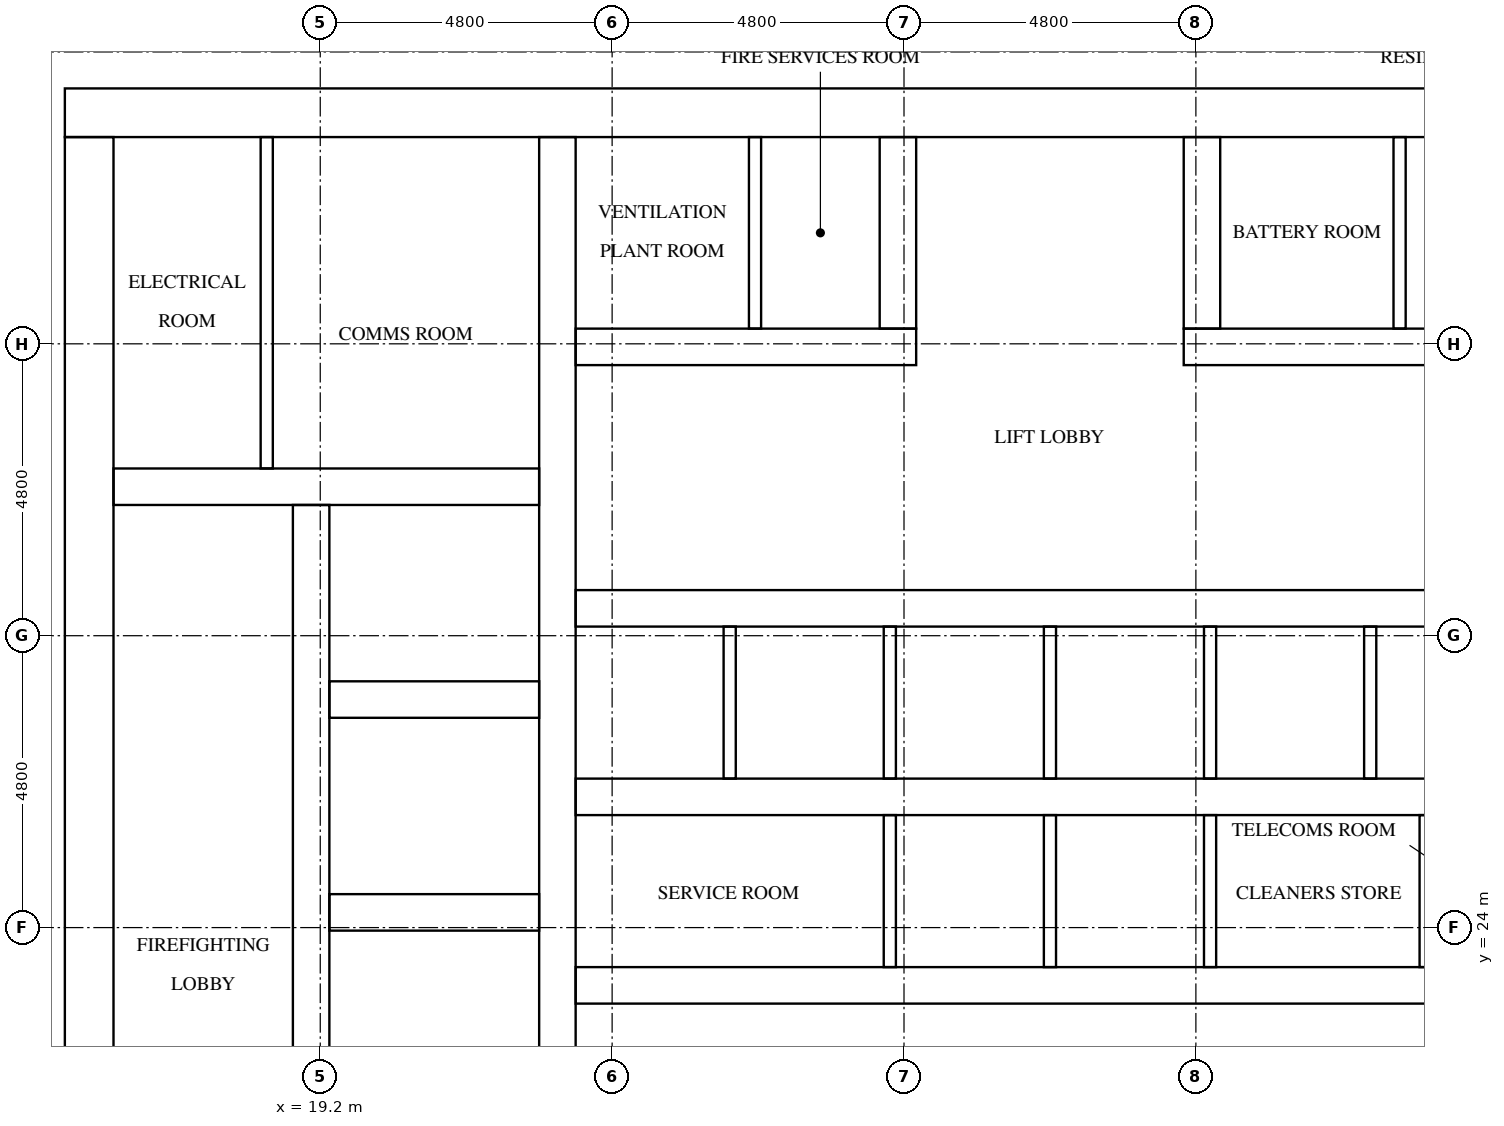
"""IFC4 building model, lengths in metres.
Left out: names, types, materials, properties, quantities, classifications, styles, units other than length and angle.
Written with IfcOpenShell. Run it as: python <this file> out.ifc"""

import sys

from ifc_helpers import new_model, si_unit, direction, frame, frame_2d, origin, place, context, subcontext, project, spatial, rectangle, extrude, element, fill, save


model = new_model("IFC4")
c1 = context("Model", 3, precision=1e-05, world=origin(), true_north=direction((0.0, 1.0)))
c2 = subcontext(c1, "Body", "Model", "MODEL_VIEW")
j1 = project(units=[si_unit("LENGTHUNIT", "METRE"), si_unit("PLANEANGLEUNIT", "RADIAN")], contexts=[c1])
p1 = place(None, origin())
s1 = spatial("IfcSite", under=j1, at=p1, CompositionType="ELEMENT")
p2 = place(p1, origin())
s2 = spatial("IfcBuilding", under=s1, at=p2, CompositionType="ELEMENT")
p3 = place(p2, frame((0.0, 0.0, 159.5)))
s3 = spatial("IfcBuildingStorey", under=s2, at=p3, CompositionType="ELEMENT", Elevation=159.5)
p4 = place(p3, frame((15.0, 37.4, 0.0), z_axis=(0.0, 0.0, 1.0), x_axis=(1.0, 0.0, 0.0)))
e1 = element("IfcWall", 1, at=p4, inside=s3, PredefinedType="SHEAR", context=c2, shape_type="SweptSolid", body=[
    extrude(rectangle(XDim=32.4, YDim=0.8, at=frame_2d((16.2, 0.0))), origin(), (0.0, 0.0, 1.0), 3.2),
])
p5 = place(p4, frame((15.3, 0.0, 0.0)))
e2 = element("IfcOpeningElement", 2, at=p5, cuts=e1, PredefinedType="OPENING", context=c2, shape_type="SweptSolid", body=[
    extrude(rectangle(XDim=1.8, YDim=2.1, at=frame_2d((0.9, 1.05))), frame((0.0, 0.41, 0.0), z_axis=(0.0, -1.0, 0.0), x_axis=(1.0, 0.0, 0.0)), (0.0, 0.0, 1.0), 0.82),
])
p6 = place(p4, frame((1.51, 0.0, 0.0)))
e3 = element("IfcOpeningElement", 3, at=p6, cuts=e1, PredefinedType="OPENING", context=c2, shape_type="SweptSolid", body=[
    extrude(rectangle(XDim=1.0, YDim=2.1, at=frame_2d((0.5, 1.05))), frame((0.0, 0.41, 0.0), z_axis=(0.0, -1.0, 0.0), x_axis=(1.0, 0.0, 0.0)), (0.0, 0.0, 1.0), 0.82),
])
p7 = place(p4, frame((5.11, 0.0, 0.0)))
e4 = element("IfcOpeningElement", 4, at=p7, cuts=e1, PredefinedType="OPENING", context=c2, shape_type="SweptSolid", body=[
    extrude(rectangle(XDim=1.0, YDim=2.1, at=frame_2d((0.5, 1.05))), frame((0.0, 0.41, 0.0), z_axis=(0.0, -1.0, 0.0), x_axis=(1.0, 0.0, 0.0)), (0.0, 0.0, 1.0), 0.82),
])
p8 = place(p3, frame((15.4, 15.8, 0.0), z_axis=(0.0, 0.0, 1.0), x_axis=(0.0, 1.0, 0.0)))
e5 = element("IfcWall", 5, at=p8, inside=s3, PredefinedType="SHEAR", context=c2, shape_type="SweptSolid", body=[
    extrude(rectangle(XDim=21.2, YDim=0.8, at=frame_2d((10.6, 0.0))), origin(), (0.0, 0.0, 1.0), 3.2),
])
p9 = place(p8, frame((4.96, 0.0, 0.0)))
e6 = element("IfcOpeningElement", 6, at=p9, cuts=e5, PredefinedType="OPENING", context=c2, shape_type="SweptSolid", body=[
    extrude(rectangle(XDim=1.2, YDim=2.1, at=frame_2d((0.6, 1.05))), frame((0.0, 0.41, 0.0), z_axis=(0.0, -1.0, 0.0), x_axis=(1.0, 0.0, 0.0)), (0.0, 0.0, 1.0), 0.82),
])
p10 = place(p3, frame((19.05, 15.8, 0.0), z_axis=(0.0, 0.0, 1.0), x_axis=(0.0, 1.0, 0.0)))
e7 = element("IfcWall", 7, at=p10, inside=s3, PredefinedType="SHEAR", context=c2, shape_type="SweptSolid", body=[
    extrude(rectangle(XDim=15.15, YDim=0.6, at=frame_2d((7.575, 0.0))), origin(), (0.0, 0.0, 1.0), 3.2),
])
p11 = place(p10, frame((9.65, 0.0, 0.0)))
e8 = element("IfcOpeningElement", 8, at=p11, cuts=e7, PredefinedType="OPENING", context=c2, shape_type="SweptSolid", body=[
    extrude(rectangle(XDim=1.1, YDim=2.1, at=frame_2d((0.55, 1.05))), frame((0.0, 0.31, 0.0), z_axis=(0.0, -1.0, 0.0), x_axis=(1.0, 0.0, 0.0)), (0.0, 0.0, 1.0), 0.62),
])
p12 = place(p10, frame((13.15, 0.0, 0.0)))
e9 = element("IfcOpeningElement", 9, at=p12, cuts=e7, PredefinedType="OPENING", context=c2, shape_type="SweptSolid", body=[
    extrude(rectangle(XDim=1.1, YDim=2.1, at=frame_2d((0.55, 1.05))), frame((0.0, 0.31, 0.0), z_axis=(0.0, -1.0, 0.0), x_axis=(1.0, 0.0, 0.0)), (0.0, 0.0, 1.0), 0.62),
])
p13 = place(p10, frame((0.4, 0.0, 0.0)))
e10 = element("IfcOpeningElement", 10, at=p13, cuts=e7, PredefinedType="OPENING", context=c2, shape_type="SweptSolid", body=[
    extrude(rectangle(XDim=1.2, YDim=2.1, at=frame_2d((0.6, 1.05))), frame((0.0, 0.31, 0.0), z_axis=(0.0, -1.0, 0.0), x_axis=(1.0, 0.0, 0.0)), (0.0, 0.0, 1.0), 0.62),
])
p14 = place(p3, frame((23.1, 15.8, 0.0), z_axis=(0.0, 0.0, 1.0), x_axis=(0.0, 1.0, 0.0)))
e11 = element("IfcWall", 11, at=p14, inside=s3, PredefinedType="SHEAR", context=c2, shape_type="SweptSolid", body=[
    extrude(rectangle(XDim=21.2, YDim=0.6, at=frame_2d((10.6, 0.0))), origin(), (0.0, 0.0, 1.0), 3.2),
])
for number, where, z_axis, x_axis in (
    (12, (19.35, 24.25, 0.0), (0.0, 0.0, 1.0), (1.0, 0.0, 0.0)),
    (13, (19.35, 27.75, 0.0), (0.0, 0.0, 1.0), (1.0, 0.0, 0.0)),
):
    element("IfcWall", number, at=place(p3, frame(where, z_axis=z_axis, x_axis=x_axis)), inside=s3, PredefinedType="SHEAR", context=c2, shape_type="SweptSolid", body=[
        extrude(rectangle(XDim=3.45, YDim=0.6, at=frame_2d((1.725, 0.0))), origin(), (0.0, 0.0, 1.0), 3.2),
    ])
p15 = place(p3, frame((15.8, 31.25, 0.0), z_axis=(0.0, 0.0, 1.0), x_axis=(1.0, 0.0, 0.0)))
e14 = element("IfcWall", 14, at=p15, inside=s3, PredefinedType="SHEAR", context=c2, shape_type="SweptSolid", body=[
    extrude(rectangle(XDim=7.0, YDim=0.6, at=frame_2d((3.5, 0.0))), origin(), (0.0, 0.0, 1.0), 3.2),
])
p16 = place(p3, frame((23.4, 23.05, 0.0), z_axis=(0.0, 0.0, 1.0), x_axis=(1.0, 0.0, 0.0)))
e15 = element("IfcWall", 15, at=p16, inside=s3, PredefinedType="SHEAR", context=c2, shape_type="SweptSolid", body=[
    extrude(rectangle(XDim=15.6, YDim=0.6, at=frame_2d((7.8, 0.0))), origin(), (0.0, 0.0, 1.0), 3.2),
])
p17 = place(p16, frame((2.033, 0.0, 0.0)))
e16 = element("IfcOpeningElement", 16, at=p17, cuts=e15, PredefinedType="OPENING", context=c2, shape_type="SweptSolid", body=[
    extrude(rectangle(XDim=1.0, YDim=2.1, at=frame_2d((0.5, 1.05))), frame((0.0, 0.31, 0.0), z_axis=(0.0, -1.0, 0.0), x_axis=(1.0, 0.0, 0.0)), (0.0, 0.0, 1.0), 0.62),
])
p18 = place(p16, frame((11.706, 0.0, 0.0)))
e17 = element("IfcOpeningElement", 17, at=p18, cuts=e15, PredefinedType="OPENING", context=c2, shape_type="SweptSolid", body=[
    extrude(rectangle(XDim=1.0, YDim=2.1, at=frame_2d((0.5, 1.05))), frame((0.0, 0.31, 0.0), z_axis=(0.0, -1.0, 0.0), x_axis=(1.0, 0.0, 0.0)), (0.0, 0.0, 1.0), 0.62),
])
p19 = place(p16, frame((14.339, 0.0, 0.0)))
e18 = element("IfcOpeningElement", 18, at=p19, cuts=e15, PredefinedType="OPENING", context=c2, shape_type="SweptSolid", body=[
    extrude(rectangle(XDim=1.0, YDim=2.1, at=frame_2d((0.5, 1.05))), frame((0.0, 0.31, 0.0), z_axis=(0.0, -1.0, 0.0), x_axis=(1.0, 0.0, 0.0)), (0.0, 0.0, 1.0), 0.62),
])
p20 = place(p3, frame((23.4, 26.15, 0.0), z_axis=(0.0, 0.0, 1.0), x_axis=(1.0, 0.0, 0.0)))
e19 = element("IfcWall", 19, at=p20, inside=s3, PredefinedType="SHEAR", context=c2, shape_type="SweptSolid", body=[
    extrude(rectangle(XDim=15.6, YDim=0.6, at=frame_2d((7.8, 0.0))), origin(), (0.0, 0.0, 1.0), 3.2),
])
p21 = place(p3, frame((23.4, 29.25, 0.0), z_axis=(0.0, 0.0, 1.0), x_axis=(1.0, 0.0, 0.0)))
e20 = element("IfcWall", 20, at=p21, inside=s3, PredefinedType="SHEAR", context=c2, shape_type="SweptSolid", body=[
    extrude(rectangle(XDim=15.6, YDim=0.6, at=frame_2d((7.8, 0.0))), origin(), (0.0, 0.0, 1.0), 3.2),
])
p22 = place(p21, frame((0.667, 0.0, 0.0)))
e21 = element("IfcOpeningElement", 21, at=p22, cuts=e20, PredefinedType="OPENING", context=c2, shape_type="SweptSolid", body=[
    extrude(rectangle(XDim=1.1, YDim=2.1, at=frame_2d((0.55, 1.05))), frame((0.0, 0.31, 0.0), z_axis=(0.0, -1.0, 0.0), x_axis=(1.0, 0.0, 0.0)), (0.0, 0.0, 1.0), 0.62),
])
p23 = place(p21, frame((3.3, 0.0, 0.0)))
e22 = element("IfcOpeningElement", 22, at=p23, cuts=e20, PredefinedType="OPENING", context=c2, shape_type="SweptSolid", body=[
    extrude(rectangle(XDim=1.1, YDim=2.1, at=frame_2d((0.55, 1.05))), frame((0.0, 0.31, 0.0), z_axis=(0.0, -1.0, 0.0), x_axis=(1.0, 0.0, 0.0)), (0.0, 0.0, 1.0), 0.62),
])
p24 = place(p21, frame((5.933, 0.0, 0.0)))
e23 = element("IfcOpeningElement", 23, at=p24, cuts=e20, PredefinedType="OPENING", context=c2, shape_type="SweptSolid", body=[
    extrude(rectangle(XDim=1.1, YDim=2.1, at=frame_2d((0.55, 1.05))), frame((0.0, 0.31, 0.0), z_axis=(0.0, -1.0, 0.0), x_axis=(1.0, 0.0, 0.0)), (0.0, 0.0, 1.0), 0.62),
])
p25 = place(p21, frame((8.567, 0.0, 0.0)))
e24 = element("IfcOpeningElement", 24, at=p25, cuts=e20, PredefinedType="OPENING", context=c2, shape_type="SweptSolid", body=[
    extrude(rectangle(XDim=1.1, YDim=2.1, at=frame_2d((0.55, 1.05))), frame((0.0, 0.31, 0.0), z_axis=(0.0, -1.0, 0.0), x_axis=(1.0, 0.0, 0.0)), (0.0, 0.0, 1.0), 0.62),
])
p26 = place(p21, frame((11.2, 0.0, 0.0)))
e25 = element("IfcOpeningElement", 25, at=p26, cuts=e20, PredefinedType="OPENING", context=c2, shape_type="SweptSolid", body=[
    extrude(rectangle(XDim=1.1, YDim=2.1, at=frame_2d((0.55, 1.05))), frame((0.0, 0.31, 0.0), z_axis=(0.0, -1.0, 0.0), x_axis=(1.0, 0.0, 0.0)), (0.0, 0.0, 1.0), 0.62),
])
p27 = place(p21, frame((13.833, 0.0, 0.0)))
e26 = element("IfcOpeningElement", 26, at=p27, cuts=e20, PredefinedType="OPENING", context=c2, shape_type="SweptSolid", body=[
    extrude(rectangle(XDim=1.1, YDim=2.1, at=frame_2d((0.55, 1.05))), frame((0.0, 0.31, 0.0), z_axis=(0.0, -1.0, 0.0), x_axis=(1.0, 0.0, 0.0)), (0.0, 0.0, 1.0), 0.62),
])
p28 = place(p3, frame((23.4, 33.55, 0.0), z_axis=(0.0, 0.0, 1.0), x_axis=(1.0, 0.0, 0.0)))
e27 = element("IfcWall", 27, at=p28, inside=s3, PredefinedType="SHEAR", context=c2, shape_type="SweptSolid", body=[
    extrude(rectangle(XDim=5.6, YDim=0.6, at=frame_2d((2.8, 0.0))), origin(), (0.0, 0.0, 1.0), 3.2),
])
p29 = place(p28, frame((0.925, 0.0, 0.0)))
e28 = element("IfcOpeningElement", 28, at=p29, cuts=e27, PredefinedType="OPENING", context=c2, shape_type="SweptSolid", body=[
    extrude(rectangle(XDim=1.0, YDim=2.1, at=frame_2d((0.5, 1.05))), frame((0.0, 0.31, 0.0), z_axis=(0.0, -1.0, 0.0), x_axis=(1.0, 0.0, 0.0)), (0.0, 0.0, 1.0), 0.62),
])
p30 = place(p28, frame((3.525, 0.0, 0.0)))
e29 = element("IfcOpeningElement", 29, at=p30, cuts=e27, PredefinedType="OPENING", context=c2, shape_type="SweptSolid", body=[
    extrude(rectangle(XDim=1.0, YDim=2.1, at=frame_2d((0.5, 1.05))), frame((0.0, 0.31, 0.0), z_axis=(0.0, -1.0, 0.0), x_axis=(1.0, 0.0, 0.0)), (0.0, 0.0, 1.0), 0.62),
])
p31 = place(p3, frame((33.4, 33.55, 0.0), z_axis=(0.0, 0.0, 1.0), x_axis=(1.0, 0.0, 0.0)))
e30 = element("IfcWall", 30, at=p31, inside=s3, PredefinedType="SHEAR", context=c2, shape_type="SweptSolid", body=[
    extrude(rectangle(XDim=5.6, YDim=0.6, at=frame_2d((2.8, 0.0))), origin(), (0.0, 0.0, 1.0), 3.2),
])
p32 = place(p31, frame((1.525, 0.0, 0.0)))
e31 = element("IfcOpeningElement", 31, at=p32, cuts=e30, PredefinedType="OPENING", context=c2, shape_type="SweptSolid", body=[
    extrude(rectangle(XDim=1.0, YDim=2.1, at=frame_2d((0.5, 1.05))), frame((0.0, 0.31, 0.0), z_axis=(0.0, -1.0, 0.0), x_axis=(1.0, 0.0, 0.0)), (0.0, 0.0, 1.0), 0.62),
])
p33 = place(p31, frame((4.125, 0.0, 0.0)))
e32 = element("IfcOpeningElement", 32, at=p33, cuts=e30, PredefinedType="OPENING", context=c2, shape_type="SweptSolid", body=[
    extrude(rectangle(XDim=1.0, YDim=2.1, at=frame_2d((0.5, 1.05))), frame((0.0, 0.31, 0.0), z_axis=(0.0, -1.0, 0.0), x_axis=(1.0, 0.0, 0.0)), (0.0, 0.0, 1.0), 0.62),
])
for number, where, z_axis, x_axis in (
    (33, (28.7, 33.85, 0.0), (0.0, 0.0, 1.0), (0.0, 1.0, 0.0)),
    (34, (33.7, 33.85, 0.0), (0.0, 0.0, 1.0), (0.0, 1.0, 0.0)),
):
    element("IfcWall", number, at=place(p3, frame(where, z_axis=z_axis, x_axis=x_axis)), inside=s3, PredefinedType="SHEAR", context=c2, shape_type="SweptSolid", body=[
        extrude(rectangle(XDim=3.15, YDim=0.6, at=frame_2d((1.575, 0.0))), origin(), (0.0, 0.0, 1.0), 3.2),
    ])
for number, where, z_axis, x_axis in (
    (35, (25.933, 26.45, 0.0), (0.0, 0.0, 1.0), (0.0, 1.0, 0.0)),
    (36, (28.567, 23.35, 0.0), (0.0, 0.0, 1.0), (0.0, 1.0, 0.0)),
    (37, (28.567, 26.45, 0.0), (0.0, 0.0, 1.0), (0.0, 1.0, 0.0)),
    (38, (31.2, 23.35, 0.0), (0.0, 0.0, 1.0), (0.0, 1.0, 0.0)),
    (39, (31.2, 26.45, 0.0), (0.0, 0.0, 1.0), (0.0, 1.0, 0.0)),
    (40, (33.833, 23.35, 0.0), (0.0, 0.0, 1.0), (0.0, 1.0, 0.0)),
    (41, (33.833, 26.45, 0.0), (0.0, 0.0, 1.0), (0.0, 1.0, 0.0)),
    (42, (36.467, 26.45, 0.0), (0.0, 0.0, 1.0), (0.0, 1.0, 0.0)),
):
    element("IfcWall", number, at=place(p3, frame(where, z_axis=z_axis, x_axis=x_axis)), inside=s3, PredefinedType="SOLIDWALL", context=c2, shape_type="SweptSolid", body=[
        extrude(rectangle(XDim=2.5, YDim=0.2, at=frame_2d((1.25, 0.0))), origin(), (0.0, 0.0, 1.0), 3.2),
    ])
p34 = place(p3, frame((18.32, 31.55, 0.0), z_axis=(0.0, 0.0, 1.0), x_axis=(0.0, 1.0, 0.0)))
e43 = element("IfcWall", 43, at=p34, inside=s3, PredefinedType="PARTITIONING", context=c2, shape_type="SweptSolid", body=[
    extrude(rectangle(XDim=5.45, YDim=0.2, at=frame_2d((2.725, 0.0))), origin(), (0.0, 0.0, 1.0), 3.2),
])
p35 = place(p3, frame((37.379, 23.35, 0.0), z_axis=(0.0, 0.0, 1.0), x_axis=(0.0, 1.0, 0.0)))
e44 = element("IfcWall", 44, at=p35, inside=s3, PredefinedType="PARTITIONING", context=c2, shape_type="SweptSolid", body=[
    extrude(rectangle(XDim=2.5, YDim=0.2, at=frame_2d((1.25, 0.0))), origin(), (0.0, 0.0, 1.0), 3.2),
])
for number, where, z_axis, x_axis in (
    (45, (26.35, 33.85, 0.0), (0.0, 0.0, 1.0), (0.0, 1.0, 0.0)),
    (46, (36.95, 33.85, 0.0), (0.0, 0.0, 1.0), (0.0, 1.0, 0.0)),
):
    element("IfcWall", number, at=place(p3, frame(where, z_axis=z_axis, x_axis=x_axis)), inside=s3, PredefinedType="PARTITIONING", context=c2, shape_type="SweptSolid", body=[
        extrude(rectangle(XDim=3.15, YDim=0.2, at=frame_2d((1.575, 0.0))), origin(), (0.0, 0.0, 1.0), 3.2),
    ])
p36 = place(p22, origin())
e47 = element("IfcDoor", 47, at=p36, inside=s3, OperationType="DOUBLE_DOOR_SLIDING", PredefinedType="DOOR", context=c2, shape_type="SweptSolid", body=[
    extrude(rectangle(XDim=1.1, YDim=2.1, at=frame_2d((0.55, 1.05))), frame((0.0, 0.025, 0.0), z_axis=(0.0, -1.0, 0.0), x_axis=(1.0, 0.0, 0.0)), (0.0, 0.0, 1.0), 0.05),
])
fill(e21, e47)
p37 = place(p23, origin())
e48 = element("IfcDoor", 48, at=p37, inside=s3, OperationType="DOUBLE_DOOR_SLIDING", PredefinedType="DOOR", context=c2, shape_type="SweptSolid", body=[
    extrude(rectangle(XDim=1.1, YDim=2.1, at=frame_2d((0.55, 1.05))), frame((0.0, 0.025, 0.0), z_axis=(0.0, -1.0, 0.0), x_axis=(1.0, 0.0, 0.0)), (0.0, 0.0, 1.0), 0.05),
])
fill(e22, e48)
p38 = place(p24, origin())
e49 = element("IfcDoor", 49, at=p38, inside=s3, OperationType="DOUBLE_DOOR_SLIDING", PredefinedType="DOOR", context=c2, shape_type="SweptSolid", body=[
    extrude(rectangle(XDim=1.1, YDim=2.1, at=frame_2d((0.55, 1.05))), frame((0.0, 0.025, 0.0), z_axis=(0.0, -1.0, 0.0), x_axis=(1.0, 0.0, 0.0)), (0.0, 0.0, 1.0), 0.05),
])
fill(e23, e49)
p39 = place(p25, origin())
e50 = element("IfcDoor", 50, at=p39, inside=s3, OperationType="DOUBLE_DOOR_SLIDING", PredefinedType="DOOR", context=c2, shape_type="SweptSolid", body=[
    extrude(rectangle(XDim=1.1, YDim=2.1, at=frame_2d((0.55, 1.05))), frame((0.0, 0.025, 0.0), z_axis=(0.0, -1.0, 0.0), x_axis=(1.0, 0.0, 0.0)), (0.0, 0.0, 1.0), 0.05),
])
fill(e24, e50)
p40 = place(p26, origin())
e51 = element("IfcDoor", 51, at=p40, inside=s3, OperationType="DOUBLE_DOOR_SLIDING", PredefinedType="DOOR", context=c2, shape_type="SweptSolid", body=[
    extrude(rectangle(XDim=1.1, YDim=2.1, at=frame_2d((0.55, 1.05))), frame((0.0, 0.025, 0.0), z_axis=(0.0, -1.0, 0.0), x_axis=(1.0, 0.0, 0.0)), (0.0, 0.0, 1.0), 0.05),
])
fill(e25, e51)
p41 = place(p27, origin())
e52 = element("IfcDoor", 52, at=p41, inside=s3, OperationType="DOUBLE_DOOR_SLIDING", PredefinedType="DOOR", context=c2, shape_type="SweptSolid", body=[
    extrude(rectangle(XDim=1.1, YDim=2.1, at=frame_2d((0.55, 1.05))), frame((0.0, 0.025, 0.0), z_axis=(0.0, -1.0, 0.0), x_axis=(1.0, 0.0, 0.0)), (0.0, 0.0, 1.0), 0.05),
])
fill(e26, e52)
p42 = place(p11, origin())
e53 = element("IfcDoor", 53, at=p42, inside=s3, OperationType="DOUBLE_DOOR_SLIDING", PredefinedType="DOOR", context=c2, shape_type="SweptSolid", body=[
    extrude(rectangle(XDim=1.1, YDim=2.1, at=frame_2d((0.55, 1.05))), frame((0.0, 0.025, 0.0), z_axis=(0.0, -1.0, 0.0), x_axis=(1.0, 0.0, 0.0)), (0.0, 0.0, 1.0), 0.05),
])
fill(e8, e53)
p43 = place(p12, origin())
e54 = element("IfcDoor", 54, at=p43, inside=s3, OperationType="DOUBLE_DOOR_SLIDING", PredefinedType="DOOR", context=c2, shape_type="SweptSolid", body=[
    extrude(rectangle(XDim=1.1, YDim=2.1, at=frame_2d((0.55, 1.05))), frame((0.0, 0.025, 0.0), z_axis=(0.0, -1.0, 0.0), x_axis=(1.0, 0.0, 0.0)), (0.0, 0.0, 1.0), 0.05),
])
fill(e9, e54)
p44 = place(p5, origin())
e55 = element("IfcDoor", 55, at=p44, inside=s3, OperationType="DOUBLE_DOOR_SINGLE_SWING", PredefinedType="DOOR", context=c2, shape_type="SweptSolid", body=[
    extrude(rectangle(XDim=1.8, YDim=2.1, at=frame_2d((0.9, 1.05))), frame((0.0, 0.025, 0.0), z_axis=(0.0, -1.0, 0.0), x_axis=(1.0, 0.0, 0.0)), (0.0, 0.0, 1.0), 0.05),
])
fill(e2, e55)
p45 = place(p6, origin())
e56 = element("IfcDoor", 56, at=p45, inside=s3, OperationType="SINGLE_SWING_RIGHT", PredefinedType="DOOR", context=c2, shape_type="SweptSolid", body=[
    extrude(rectangle(XDim=1.0, YDim=2.1, at=frame_2d((0.5, 1.05))), frame((0.0, 0.025, 0.0), z_axis=(0.0, -1.0, 0.0), x_axis=(1.0, 0.0, 0.0)), (0.0, 0.0, 1.0), 0.05),
])
fill(e3, e56)
p46 = place(p7, origin())
e57 = element("IfcDoor", 57, at=p46, inside=s3, OperationType="SINGLE_SWING_LEFT", PredefinedType="DOOR", context=c2, shape_type="SweptSolid", body=[
    extrude(rectangle(XDim=1.0, YDim=2.1, at=frame_2d((0.5, 1.05))), frame((0.0, 0.025, 0.0), z_axis=(0.0, -1.0, 0.0), x_axis=(1.0, 0.0, 0.0)), (0.0, 0.0, 1.0), 0.05),
])
fill(e4, e57)
p47 = place(p17, frame((1.0, 0.0, 0.0), z_axis=(0.0, 0.0, 1.0), x_axis=(-1.0, 0.0, 0.0)))
e58 = element("IfcDoor", 58, at=p47, inside=s3, OperationType="SINGLE_SWING_RIGHT", PredefinedType="DOOR", context=c2, shape_type="SweptSolid", body=[
    extrude(rectangle(XDim=1.0, YDim=2.1, at=frame_2d((0.5, 1.05))), frame((0.0, 0.025, 0.0), z_axis=(0.0, -1.0, 0.0), x_axis=(1.0, 0.0, 0.0)), (0.0, 0.0, 1.0), 0.05),
])
fill(e16, e58)
p48 = place(p18, frame((1.0, 0.0, 0.0), z_axis=(0.0, 0.0, 1.0), x_axis=(-1.0, 0.0, 0.0)))
e59 = element("IfcDoor", 59, at=p48, inside=s3, OperationType="SINGLE_SWING_LEFT", PredefinedType="DOOR", context=c2, shape_type="SweptSolid", body=[
    extrude(rectangle(XDim=1.0, YDim=2.1, at=frame_2d((0.5, 1.05))), frame((0.0, 0.025, 0.0), z_axis=(0.0, -1.0, 0.0), x_axis=(1.0, 0.0, 0.0)), (0.0, 0.0, 1.0), 0.05),
])
fill(e17, e59)
p49 = place(p29, frame((1.0, 0.0, 0.0), z_axis=(0.0, 0.0, 1.0), x_axis=(-1.0, 0.0, 0.0)))
e60 = element("IfcDoor", 60, at=p49, inside=s3, OperationType="SINGLE_SWING_LEFT", PredefinedType="DOOR", context=c2, shape_type="SweptSolid", body=[
    extrude(rectangle(XDim=1.0, YDim=2.1, at=frame_2d((0.5, 1.05))), frame((0.0, 0.025, 0.0), z_axis=(0.0, -1.0, 0.0), x_axis=(1.0, 0.0, 0.0)), (0.0, 0.0, 1.0), 0.05),
])
fill(e28, e60)
p50 = place(p30, frame((1.0, 0.0, 0.0), z_axis=(0.0, 0.0, 1.0), x_axis=(-1.0, 0.0, 0.0)))
e61 = element("IfcDoor", 61, at=p50, inside=s3, OperationType="SINGLE_SWING_RIGHT", PredefinedType="DOOR", context=c2, shape_type="SweptSolid", body=[
    extrude(rectangle(XDim=1.0, YDim=2.1, at=frame_2d((0.5, 1.05))), frame((0.0, 0.025, 0.0), z_axis=(0.0, -1.0, 0.0), x_axis=(1.0, 0.0, 0.0)), (0.0, 0.0, 1.0), 0.05),
])
fill(e29, e61)
p51 = place(p32, frame((1.0, 0.0, 0.0), z_axis=(0.0, 0.0, 1.0), x_axis=(-1.0, 0.0, 0.0)))
e62 = element("IfcDoor", 62, at=p51, inside=s3, OperationType="SINGLE_SWING_LEFT", PredefinedType="DOOR", context=c2, shape_type="SweptSolid", body=[
    extrude(rectangle(XDim=1.0, YDim=2.1, at=frame_2d((0.5, 1.05))), frame((0.0, 0.025, 0.0), z_axis=(0.0, -1.0, 0.0), x_axis=(1.0, 0.0, 0.0)), (0.0, 0.0, 1.0), 0.05),
])
fill(e31, e62)
save(model, sys.argv[1])
